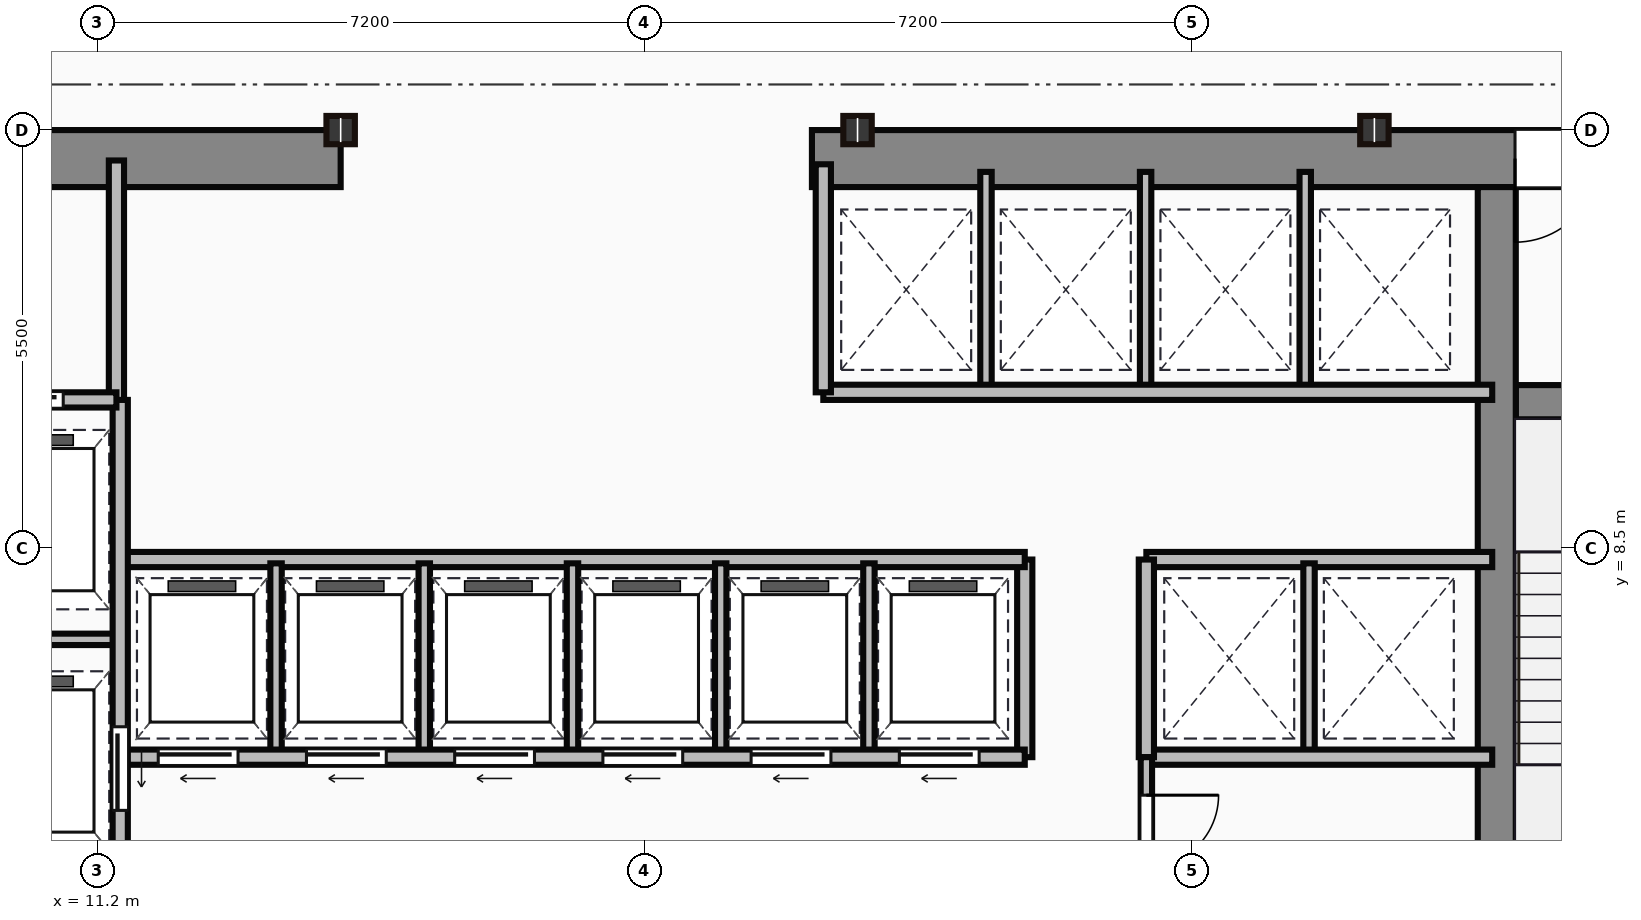
"""IFC4 building model, lengths in metres.
Left out: names, types, materials, properties, quantities, classifications, styles, units other than length and angle.
Written with IfcOpenShell. Run it as: python <this file> out.ifc"""

import sys

from ifc_helpers import new_model, si_unit, direction, frame, frame_2d, origin, origin_2d, place, context, subcontext, project, spatial, rectangle, i_section, extrude, source, transform, mapped, element, fill, save


model = new_model("IFC4")
c1 = context("Model", 3, precision=1e-05, world=origin(), true_north=direction((0.0, 1.0)))
c2 = subcontext(c1, "Body", "Model", "MODEL_VIEW")
j1 = project(units=[si_unit("LENGTHUNIT", "METRE"), si_unit("PLANEANGLEUNIT", "RADIAN")], contexts=[c1])
p1 = place(None, origin())
s1 = spatial("IfcSite", under=j1, at=p1, CompositionType="ELEMENT")
p2 = place(p1, origin())
s2 = spatial("IfcBuilding", under=s1, at=p2, CompositionType="ELEMENT")
p3 = place(p2, frame((0.0, 0.0, 158.85)))
s3 = spatial("IfcBuildingStorey", under=s2, at=p3, CompositionType="ELEMENT", Elevation=158.85)
m1 = source(origin(), c2, "Body", "SweptSolid", [
    extrude(rectangle(XDim=9.1, YDim=0.75, at=frame_2d((4.55, 0.0))), origin(), (0.0, 0.0, 1.0), 3.65),
])
p4 = place(p3, frame((5.3, 13.625, 0.0), z_axis=(0.0, 0.0, 1.0), x_axis=(1.0, 0.0, 0.0)))
e1 = element("IfcWall", 1, at=p4, inside=s3, PredefinedType="SHEAR", context=c2, shape_type="MappedRepresentation", body=[
    mapped(m1, transform((0.0, 0.0, 0.0))),
])
p5 = place(p4, frame((4.1, 0.0, 0.0)))
e2 = element("IfcOpeningElement", 2, at=p5, cuts=e1, PredefinedType="OPENING", context=c2, shape_type="SweptSolid", body=[
    extrude(rectangle(XDim=1.1, YDim=2.15, at=frame_2d((0.55, 1.075))), frame((0.0, 0.385, 0.0), z_axis=(0.0, -1.0, 0.0), x_axis=(1.0, 0.0, 0.0)), (0.0, 0.0, 1.0), 0.77),
])
m2 = source(origin(), c2, "Body", "SweptSolid", [
    extrude(rectangle(XDim=12.6, YDim=0.75, at=frame_2d((6.3, 0.0))), origin(), (0.0, 0.0, 1.0), 3.65),
])
p6 = place(p3, frame((20.6, 13.625, 0.0), z_axis=(0.0, 0.0, 1.0), x_axis=(1.0, 0.0, 0.0)))
e3 = element("IfcWall", 3, at=p6, inside=s3, PredefinedType="SHEAR", context=c2, shape_type="MappedRepresentation", body=[
    mapped(m2, transform((0.0, 0.0, 0.0))),
])
p7 = place(p6, frame((9.25, 0.0, 0.0)))
e4 = element("IfcOpeningElement", 4, at=p7, cuts=e3, PredefinedType="OPENING", context=c2, shape_type="SweptSolid", body=[
    extrude(rectangle(XDim=1.1, YDim=2.15, at=frame_2d((0.55, 1.075))), frame((0.0, 0.385, 0.0), z_axis=(0.0, -1.0, 0.0), x_axis=(1.0, 0.0, 0.0)), (0.0, 0.0, 1.0), 0.77),
])
m3 = source(origin(), c2, "Body", "SweptSolid", [
    extrude(rectangle(XDim=12.35, YDim=0.5, at=frame_2d((6.175, 0.0))), origin(), (0.0, 0.0, 1.0), 3.65),
])
p8 = place(p3, frame((29.61, 0.9, 0.0), z_axis=(0.0, 0.0, 1.0), x_axis=(0.0, 1.0, 0.0)))
e5 = element("IfcWall", 5, at=p8, inside=s3, PredefinedType="SHEAR", context=c2, shape_type="MappedRepresentation", body=[
    mapped(m3, transform((0.0, 0.0, 0.0))),
])
m4 = source(origin(), c2, "Body", "SweptSolid", [
    extrude(rectangle(XDim=3.39, YDim=0.45, at=frame_2d((1.695, 0.0))), origin(), (0.0, 0.0, 1.0), 3.65),
])
p9 = place(p3, frame((29.86, 10.42, 0.0), z_axis=(0.0, 0.0, 1.0), x_axis=(1.0, 0.0, 0.0)))
e6 = element("IfcWall", 6, at=p9, inside=s3, PredefinedType="SHEAR", context=c2, shape_type="MappedRepresentation", body=[
    mapped(m4, transform((0.0, 0.0, 0.0))),
])
p10 = place(p9, frame((1.1, 0.0, 0.0)))
e7 = element("IfcOpeningElement", 7, at=p10, cuts=e6, PredefinedType="OPENING", context=c2, shape_type="SweptSolid", body=[
    extrude(rectangle(XDim=1.1, YDim=2.15, at=frame_2d((0.55, 1.075))), frame((0.0, 0.235, 0.0), z_axis=(0.0, -1.0, 0.0), x_axis=(1.0, 0.0, 0.0)), (0.0, 0.0, 1.0), 0.47),
])
m5 = source(origin(), c2, "Body", "SweptSolid", [
    extrude(i_section(OverallWidth=0.374, OverallDepth=0.372, WebThickness=0.016, FlangeThickness=0.026, at=origin_2d()), origin(), (0.0, 0.0, 1.0), 3.65),
])
for number, where, z_axis, x_axis in (
    (8, (14.4, 14.0, 0.0), (0.0, 0.0, 1.0), (1.0, 0.0, 0.0)),
    (9, (21.2, 14.0, 0.0), (0.0, 0.0, 1.0), (1.0, 0.0, 0.0)),
    (10, (28.0, 14.0, 0.0), (0.0, 0.0, 1.0), (1.0, 0.0, 0.0)),
):
    element("IfcColumn", number, at=place(p3, frame(where, z_axis=z_axis, x_axis=x_axis)), inside=s3, PredefinedType="COLUMN", context=c2, shape_type="MappedRepresentation", body=[
        mapped(m5, transform((0.0, 0.0, 0.0))),
    ])
m6 = source(origin(), c2, "Body", "SweptSolid", [
    extrude(rectangle(XDim=3.18, YDim=0.2, at=frame_2d((1.59, 0.0))), origin(), (0.0, 0.0, 1.0), 3.4),
])
p11 = place(p3, frame((11.45, 10.42, 0.0), z_axis=(0.0, 0.0, 1.0), x_axis=(0.0, 1.0, 0.0)))
e11 = element("IfcWall", 11, at=p11, inside=s3, PredefinedType="PARTITIONING", context=c2, shape_type="MappedRepresentation", body=[
    mapped(m6, transform((0.0, 0.0, 0.0))),
])
m7 = source(origin(), c2, "Body", "SweptSolid", [
    extrude(rectangle(XDim=2.35, YDim=0.2, at=frame_2d((1.175, 0.0))), origin(), (0.0, 0.0, 1.0), 3.4),
])
p12 = place(p3, frame((9.1, 10.45, 0.0), z_axis=(0.0, 0.0, 1.0), x_axis=(1.0, 0.0, 0.0)))
e12 = element("IfcWall", 12, at=p12, inside=s3, PredefinedType="PARTITIONING", context=c2, shape_type="MappedRepresentation", body=[
    mapped(m7, transform((0.0, 0.0, 0.0))),
])
p13 = place(p12, frame((0.55, 0.0, 0.0)))
e13 = element("IfcOpeningElement", 13, at=p13, cuts=e12, PredefinedType="OPENING", context=c2, shape_type="SweptSolid", body=[
    extrude(rectangle(XDim=1.1, YDim=2.15, at=frame_2d((0.55, 1.075))), frame((0.0, 0.11, 0.0), z_axis=(0.0, -1.0, 0.0), x_axis=(1.0, 0.0, 0.0)), (0.0, 0.0, 1.0), 0.22),
])
m8 = source(origin(), c2, "Body", "SweptSolid", [
    extrude(rectangle(XDim=9.6, YDim=0.2, at=frame_2d((4.8, 0.0))), origin(), (0.0, 0.0, 1.0), 3.4),
])
p14 = place(p3, frame((11.5, 0.85, 0.0), z_axis=(0.0, 0.0, 1.0), x_axis=(0.0, 1.0, 0.0)))
e14 = element("IfcWall", 14, at=p14, inside=s3, PredefinedType="PARTITIONING", context=c2, shape_type="MappedRepresentation", body=[
    mapped(m8, transform((0.0, 0.0, 0.0))),
])
p15 = place(p14, frame((4.2, 0.0, 0.0)))
e15 = element("IfcOpeningElement", 15, at=p15, cuts=e14, PredefinedType="OPENING", context=c2, shape_type="SweptSolid", body=[
    extrude(rectangle(XDim=1.1, YDim=2.15, at=frame_2d((0.55, 1.075))), frame((0.0, 0.11, 0.0), z_axis=(0.0, -1.0, 0.0), x_axis=(1.0, 0.0, 0.0)), (0.0, 0.0, 1.0), 0.22),
])
p16 = place(p14, frame((0.9, 0.0, 0.0)))
e16 = element("IfcOpeningElement", 16, at=p16, cuts=e14, PredefinedType="OPENING", context=c2, shape_type="SweptSolid", body=[
    extrude(rectangle(XDim=1.2, YDim=2.15, at=frame_2d((0.6, 1.075))), frame((0.0, 0.11, 0.0), z_axis=(0.0, -1.0, 0.0), x_axis=(1.0, 0.0, 0.0)), (0.0, 0.0, 1.0), 0.22),
])
m9 = source(origin(), c2, "Body", "SweptSolid", [
    extrude(rectangle(XDim=2.4, YDim=0.15, at=frame_2d((1.2, 0.0))), origin(), (0.0, 0.0, 1.0), 3.4),
])
p17 = place(p3, frame((9.1, 7.3, 0.0), z_axis=(0.0, 0.0, 1.0), x_axis=(1.0, 0.0, 0.0)))
e17 = element("IfcWall", 17, at=p17, inside=s3, PredefinedType="PARTITIONING", context=c2, shape_type="MappedRepresentation", body=[
    mapped(m9, transform((0.0, 0.0, 0.0))),
])
m10 = source(origin(), c2, "Body", "SweptSolid", [
    extrude(rectangle(XDim=11.85, YDim=0.2, at=frame_2d((5.925, 0.0))), origin(), (0.0, 0.0, 1.0), 3.4),
])
p18 = place(p3, frame((11.55, 5.75, 0.0), z_axis=(0.0, 0.0, 1.0), x_axis=(1.0, 0.0, 0.0)))
e18 = element("IfcWall", 18, at=p18, inside=s3, PredefinedType="PARTITIONING", context=c2, shape_type="MappedRepresentation", body=[
    mapped(m10, transform((0.0, 0.0, 0.0))),
])
p19 = place(p18, frame((0.45, 0.0, 0.0)))
e19 = element("IfcOpeningElement", 19, at=p19, cuts=e18, PredefinedType="OPENING", context=c2, shape_type="SweptSolid", body=[
    extrude(rectangle(XDim=1.05, YDim=2.15, at=frame_2d((0.525, 1.075))), frame((0.0, 0.11, 0.0), z_axis=(0.0, -1.0, 0.0), x_axis=(1.0, 0.0, 0.0)), (0.0, 0.0, 1.0), 0.22),
])
p20 = place(p18, frame((2.4, 0.0, 0.0)))
e20 = element("IfcOpeningElement", 20, at=p20, cuts=e18, PredefinedType="OPENING", context=c2, shape_type="SweptSolid", body=[
    extrude(rectangle(XDim=1.05, YDim=2.15, at=frame_2d((0.525, 1.075))), frame((0.0, 0.11, 0.0), z_axis=(0.0, -1.0, 0.0), x_axis=(1.0, 0.0, 0.0)), (0.0, 0.0, 1.0), 0.22),
])
p21 = place(p18, frame((4.35, 0.0, 0.0)))
e21 = element("IfcOpeningElement", 21, at=p21, cuts=e18, PredefinedType="OPENING", context=c2, shape_type="SweptSolid", body=[
    extrude(rectangle(XDim=1.05, YDim=2.15, at=frame_2d((0.525, 1.075))), frame((0.0, 0.11, 0.0), z_axis=(0.0, -1.0, 0.0), x_axis=(1.0, 0.0, 0.0)), (0.0, 0.0, 1.0), 0.22),
])
p22 = place(p18, frame((6.3, 0.0, 0.0)))
e22 = element("IfcOpeningElement", 22, at=p22, cuts=e18, PredefinedType="OPENING", context=c2, shape_type="SweptSolid", body=[
    extrude(rectangle(XDim=1.05, YDim=2.15, at=frame_2d((0.525, 1.075))), frame((0.0, 0.11, 0.0), z_axis=(0.0, -1.0, 0.0), x_axis=(1.0, 0.0, 0.0)), (0.0, 0.0, 1.0), 0.22),
])
p23 = place(p18, frame((8.25, 0.0, 0.0)))
e23 = element("IfcOpeningElement", 23, at=p23, cuts=e18, PredefinedType="OPENING", context=c2, shape_type="SweptSolid", body=[
    extrude(rectangle(XDim=1.05, YDim=2.15, at=frame_2d((0.525, 1.075))), frame((0.0, 0.11, 0.0), z_axis=(0.0, -1.0, 0.0), x_axis=(1.0, 0.0, 0.0)), (0.0, 0.0, 1.0), 0.22),
])
p24 = place(p18, frame((10.2, 0.0, 0.0)))
e24 = element("IfcOpeningElement", 24, at=p24, cuts=e18, PredefinedType="OPENING", context=c2, shape_type="SweptSolid", body=[
    extrude(rectangle(XDim=1.05, YDim=2.15, at=frame_2d((0.525, 1.075))), frame((0.0, 0.11, 0.0), z_axis=(0.0, -1.0, 0.0), x_axis=(1.0, 0.0, 0.0)), (0.0, 0.0, 1.0), 0.22),
])
p25 = place(p3, frame((11.55, 8.35, 0.0), z_axis=(0.0, 0.0, 1.0), x_axis=(1.0, 0.0, 0.0)))
e25 = element("IfcWall", 25, at=p25, inside=s3, PredefinedType="PARTITIONING", context=c2, shape_type="MappedRepresentation", body=[
    mapped(m10, transform((0.0, 0.0, 0.0))),
])
m11 = source(origin(), c2, "Body", "SweptSolid", [
    extrude(rectangle(XDim=2.6, YDim=0.2, at=frame_2d((1.3, 0.0))), origin(), (0.0, 0.0, 1.0), 3.4),
])
p26 = place(p3, frame((23.4, 5.75, 0.0), z_axis=(0.0, 0.0, 1.0), x_axis=(0.0, 1.0, 0.0)))
e26 = element("IfcWall", 26, at=p26, inside=s3, PredefinedType="PARTITIONING", context=c2, shape_type="MappedRepresentation", body=[
    mapped(m11, transform((0.0, 0.0, 0.0))),
])
m12 = source(origin(), c2, "Body", "SweptSolid", [
    extrude(rectangle(XDim=2.5, YDim=0.15, at=frame_2d((1.25, 0.0))), origin(), (0.0, 0.0, 1.0), 3.4),
])
for number, where, z_axis, x_axis in (
    (27, (13.55, 5.8, 0.0), (0.0, 0.0, 1.0), (0.0, 1.0, 0.0)),
    (28, (15.5, 5.8, 0.0), (0.0, 0.0, 1.0), (0.0, 1.0, 0.0)),
    (29, (17.45, 5.8, 0.0), (0.0, 0.0, 1.0), (0.0, 1.0, 0.0)),
    (30, (19.4, 5.8, 0.0), (0.0, 0.0, 1.0), (0.0, 1.0, 0.0)),
    (31, (21.35, 5.8, 0.0), (0.0, 0.0, 1.0), (0.0, 1.0, 0.0)),
):
    element("IfcWall", number, at=place(p3, frame(where, z_axis=z_axis, x_axis=x_axis)), inside=s3, PredefinedType="PARTITIONING", context=c2, shape_type="MappedRepresentation", body=[
        mapped(m12, transform((0.0, 0.0, 0.0))),
    ])
m13 = source(origin(), c2, "Body", "SweptSolid", [
    extrude(rectangle(XDim=8.8, YDim=0.2, at=frame_2d((4.4, 0.0))), origin(), (0.0, 0.0, 1.0), 3.4),
])
p27 = place(p3, frame((20.75, 10.55, 0.0), z_axis=(0.0, 0.0, 1.0), x_axis=(1.0, 0.0, 0.0)))
e32 = element("IfcWall", 32, at=p27, inside=s3, PredefinedType="PARTITIONING", context=c2, shape_type="MappedRepresentation", body=[
    mapped(m13, transform((0.0, 0.0, 0.0))),
])
m14 = source(origin(), c2, "Body", "SweptSolid", [
    extrude(rectangle(XDim=3.0, YDim=0.2, at=frame_2d((1.5, 0.0))), origin(), (0.0, 0.0, 1.0), 3.4),
])
p28 = place(p3, frame((20.75, 10.55, 0.0), z_axis=(0.0, 0.0, 1.0), x_axis=(0.0, 1.0, 0.0)))
e33 = element("IfcWall", 33, at=p28, inside=s3, PredefinedType="PARTITIONING", context=c2, shape_type="MappedRepresentation", body=[
    mapped(m14, transform((0.0, 0.0, 0.0))),
])
m15 = source(origin(), c2, "Body", "SweptSolid", [
    extrude(rectangle(XDim=2.85, YDim=0.15, at=frame_2d((1.425, 0.0))), origin(), (0.0, 0.0, 1.0), 3.4),
])
for number, where, z_axis, x_axis in (
    (34, (22.89, 10.6, 0.0), (0.0, 0.0, 1.0), (0.0, 1.0, 0.0)),
    (35, (24.99, 10.6, 0.0), (0.0, 0.0, 1.0), (0.0, 1.0, 0.0)),
    (36, (27.09, 10.6, 0.0), (0.0, 0.0, 1.0), (0.0, 1.0, 0.0)),
):
    element("IfcWall", number, at=place(p3, frame(where, z_axis=z_axis, x_axis=x_axis)), inside=s3, PredefinedType="PARTITIONING", context=c2, shape_type="MappedRepresentation", body=[
        mapped(m15, transform((0.0, 0.0, 0.0))),
    ])
m16 = source(origin(), c2, "Body", "SweptSolid", [
    extrude(rectangle(XDim=4.55, YDim=0.2, at=frame_2d((2.275, 0.0))), origin(), (0.0, 0.0, 1.0), 3.4),
])
for number, where, z_axis, x_axis in (
    (37, (25.0, 8.35, 0.0), (0.0, 0.0, 1.0), (1.0, 0.0, 0.0)),
    (38, (25.0, 5.75, 0.0), (0.0, 0.0, 1.0), (1.0, 0.0, 0.0)),
):
    element("IfcWall", number, at=place(p3, frame(where, z_axis=z_axis, x_axis=x_axis)), inside=s3, PredefinedType="PARTITIONING", context=c2, shape_type="MappedRepresentation", body=[
        mapped(m16, transform((0.0, 0.0, 0.0))),
    ])
p29 = place(p3, frame((25.0, 5.75, 0.0), z_axis=(0.0, 0.0, 1.0), x_axis=(0.0, 1.0, 0.0)))
e39 = element("IfcWall", 39, at=p29, inside=s3, PredefinedType="PARTITIONING", context=c2, shape_type="MappedRepresentation", body=[
    mapped(m11, transform((0.0, 0.0, 0.0))),
])
p30 = place(p3, frame((27.14, 5.8, 0.0), z_axis=(0.0, 0.0, 1.0), x_axis=(0.0, 1.0, 0.0)))
e40 = element("IfcWall", 40, at=p30, inside=s3, PredefinedType="PARTITIONING", context=c2, shape_type="MappedRepresentation", body=[
    mapped(m12, transform((0.0, 0.0, 0.0))),
])
m17 = source(origin(), c2, "Body", "SweptSolid", [
    extrude(rectangle(XDim=4.9, YDim=0.15, at=frame_2d((2.45, 0.0))), origin(), (0.0, 0.0, 1.0), 3.4),
])
p31 = place(p3, frame((25.0, 0.85, 0.0), z_axis=(0.0, 0.0, 1.0), x_axis=(0.0, 1.0, 0.0)))
e41 = element("IfcWall", 41, at=p31, inside=s3, PredefinedType="PARTITIONING", context=c2, shape_type="MappedRepresentation", body=[
    mapped(m17, transform((0.0, 0.0, 0.0))),
])
p32 = place(p31, frame((1.8, 0.0, 0.0)))
e42 = element("IfcOpeningElement", 42, at=p32, cuts=e41, PredefinedType="OPENING", context=c2, shape_type="SweptSolid", body=[
    extrude(rectangle(XDim=0.95, YDim=2.15, at=frame_2d((0.475, 1.075))), frame((0.0, 0.085, 0.0), z_axis=(0.0, -1.0, 0.0), x_axis=(1.0, 0.0, 0.0)), (0.0, 0.0, 1.0), 0.17),
])
p33 = place(p31, frame((3.45, 0.0, 0.0)))
e43 = element("IfcOpeningElement", 43, at=p33, cuts=e41, PredefinedType="OPENING", context=c2, shape_type="SweptSolid", body=[
    extrude(rectangle(XDim=0.95, YDim=2.15, at=frame_2d((0.475, 1.075))), frame((0.0, 0.085, 0.0), z_axis=(0.0, -1.0, 0.0), x_axis=(1.0, 0.0, 0.0)), (0.0, 0.0, 1.0), 0.17),
])
m18 = source(origin(), c2, "Body", "SweptSolid", [
    extrude(rectangle(XDim=1.1, YDim=2.15, at=frame_2d((0.55, 1.075))), frame((0.0, 0.025, 0.0), z_axis=(0.0, -1.0, 0.0), x_axis=(1.0, 0.0, 0.0)), (0.0, 0.0, 1.0), 0.05),
])
p34 = place(p7, origin())
e44 = element("IfcDoor", 44, at=p34, inside=s3, OperationType="SINGLE_SWING_LEFT", PredefinedType="DOOR", context=c2, shape_type="MappedRepresentation", body=[
    mapped(m18, transform((0.0, 0.0, 0.0))),
])
fill(e4, e44)
p35 = place(p13, origin())
e45 = element("IfcDoor", 45, at=p35, inside=s3, OperationType="SLIDING_TO_LEFT", PredefinedType="DOOR", context=c2, shape_type="MappedRepresentation", body=[
    mapped(m18, transform((0.0, 0.0, 0.0))),
])
fill(e13, e45)
p36 = place(p15, frame((1.1, 0.0, 0.0), z_axis=(0.0, 0.0, 1.0), x_axis=(-1.0, 0.0, 0.0)))
e46 = element("IfcDoor", 46, at=p36, inside=s3, OperationType="SLIDING_TO_LEFT", PredefinedType="DOOR", context=c2, shape_type="MappedRepresentation", body=[
    mapped(m18, transform((0.0, 0.0, 0.0))),
])
fill(e15, e46)
m19 = source(origin(), c2, "Body", "SweptSolid", [
    extrude(rectangle(XDim=1.05, YDim=2.15, at=frame_2d((0.525, 1.075))), frame((0.0, 0.025, 0.0), z_axis=(0.0, -1.0, 0.0), x_axis=(1.0, 0.0, 0.0)), (0.0, 0.0, 1.0), 0.05),
])
p37 = place(p19, frame((1.05, 0.0, 0.0), z_axis=(0.0, 0.0, 1.0), x_axis=(-1.0, 0.0, 0.0)))
e47 = element("IfcDoor", 47, at=p37, inside=s3, OperationType="SLIDING_TO_LEFT", PredefinedType="DOOR", context=c2, shape_type="MappedRepresentation", body=[
    mapped(m19, transform((0.0, 0.0, 0.0))),
])
fill(e19, e47)
p38 = place(p20, frame((1.05, 0.0, 0.0), z_axis=(0.0, 0.0, 1.0), x_axis=(-1.0, 0.0, 0.0)))
e48 = element("IfcDoor", 48, at=p38, inside=s3, OperationType="SLIDING_TO_LEFT", PredefinedType="DOOR", context=c2, shape_type="MappedRepresentation", body=[
    mapped(m19, transform((0.0, 0.0, 0.0))),
])
fill(e20, e48)
p39 = place(p21, frame((1.05, 0.0, 0.0), z_axis=(0.0, 0.0, 1.0), x_axis=(-1.0, 0.0, 0.0)))
e49 = element("IfcDoor", 49, at=p39, inside=s3, OperationType="SLIDING_TO_LEFT", PredefinedType="DOOR", context=c2, shape_type="MappedRepresentation", body=[
    mapped(m19, transform((0.0, 0.0, 0.0))),
])
fill(e21, e49)
p40 = place(p22, frame((1.05, 0.0, 0.0), z_axis=(0.0, 0.0, 1.0), x_axis=(-1.0, 0.0, 0.0)))
e50 = element("IfcDoor", 50, at=p40, inside=s3, OperationType="SLIDING_TO_LEFT", PredefinedType="DOOR", context=c2, shape_type="MappedRepresentation", body=[
    mapped(m19, transform((0.0, 0.0, 0.0))),
])
fill(e22, e50)
p41 = place(p23, frame((1.05, 0.0, 0.0), z_axis=(0.0, 0.0, 1.0), x_axis=(-1.0, 0.0, 0.0)))
e51 = element("IfcDoor", 51, at=p41, inside=s3, OperationType="SLIDING_TO_LEFT", PredefinedType="DOOR", context=c2, shape_type="MappedRepresentation", body=[
    mapped(m19, transform((0.0, 0.0, 0.0))),
])
fill(e23, e51)
p42 = place(p24, frame((1.05, 0.0, 0.0), z_axis=(0.0, 0.0, 1.0), x_axis=(-1.0, 0.0, 0.0)))
e52 = element("IfcDoor", 52, at=p42, inside=s3, OperationType="SLIDING_TO_LEFT", PredefinedType="DOOR", context=c2, shape_type="MappedRepresentation", body=[
    mapped(m19, transform((0.0, 0.0, 0.0))),
])
fill(e24, e52)
m20 = source(origin(), c2, "Body", "SweptSolid", [
    extrude(rectangle(XDim=0.95, YDim=2.15, at=frame_2d((0.475, 1.075))), frame((0.0, 0.025, 0.0), z_axis=(0.0, -1.0, 0.0), x_axis=(1.0, 0.0, 0.0)), (0.0, 0.0, 1.0), 0.05),
])
p43 = place(p33, origin())
e53 = element("IfcDoor", 53, at=p43, inside=s3, OperationType="SINGLE_SWING_RIGHT", PredefinedType="DOOR", context=c2, shape_type="MappedRepresentation", body=[
    mapped(m20, transform((0.0, 0.0, 0.0))),
])
fill(e43, e53)
save(model, sys.argv[1])
